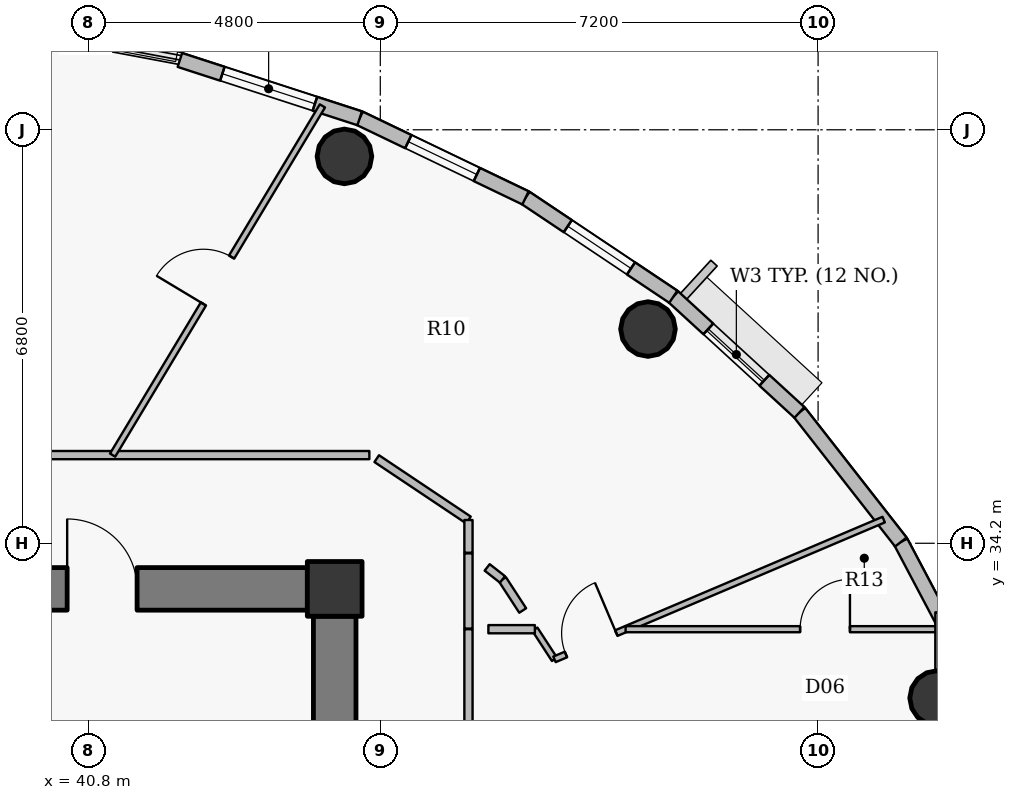
"""IFC4 building model, lengths in metres.
Left out: names, types, materials, properties, quantities, classifications, styles, units other than length and angle.
Written with IfcOpenShell. Run it as: python <this file> out.ifc"""

import sys

from ifc_helpers import new_model, si_unit, direction, frame, frame_2d, origin, origin_2d, place, context, subcontext, project, spatial, rectangle, hollow_circle, extrude, source, transform, mapped, element, fill, save


model = new_model("IFC4")
c1 = context("Model", 3, precision=1e-05, world=origin(), true_north=direction((0.0, 1.0)))
c2 = subcontext(c1, "Body", "Model", "MODEL_VIEW")
j1 = project(units=[si_unit("LENGTHUNIT", "METRE"), si_unit("PLANEANGLEUNIT", "RADIAN")], contexts=[c1])
p1 = place(None, origin())
s1 = spatial("IfcSite", under=j1, at=p1, CompositionType="ELEMENT")
p2 = place(p1, origin())
s2 = spatial("IfcBuilding", under=s1, at=p2, CompositionType="ELEMENT")
p3 = place(p2, frame((0.0, 0.0, 343.0)))
s3 = spatial("IfcBuildingStorey", under=s2, at=p3, CompositionType="ELEMENT", Elevation=343.0)
p4 = place(p3, frame((44.85, 33.45, 0.0), z_axis=(0.0, 0.0, 1.0), x_axis=(1.0, 0.0, 0.0)))
e1 = element("IfcColumn", 1, at=p4, inside=s3, PredefinedType="COLUMN", context=c2, shape_type="SweptSolid", body=[
    extrude(rectangle(XDim=0.9, YDim=0.9, at=origin_2d()), origin(), (0.0, 0.0, 1.0), 3.8),
])
p5 = place(p3, frame((27.6, 33.45, 0.0), z_axis=(0.0, 0.0, 1.0), x_axis=(1.0, 0.0, 0.0)))
e2 = element("IfcWall", 2, at=p5, inside=s3, PredefinedType="SHEAR", context=c2, shape_type="SweptSolid", body=[
    extrude(rectangle(XDim=16.8, YDim=0.7, at=frame_2d((8.4, 0.0))), origin(), (0.0, 0.0, 1.0), 3.05),
])
p6 = place(p5, frame((12.85, 0.0, 0.0)))
e3 = element("IfcOpeningElement", 3, at=p6, cuts=e2, PredefinedType="OPENING", context=c2, shape_type="SweptSolid", body=[
    extrude(rectangle(XDim=1.15, YDim=2.15, at=origin_2d()), frame((0.575, 0.36, 1.075), z_axis=(0.0, -1.0, 0.0), x_axis=(1.0, 0.0, 0.0)), (0.0, 0.0, 1.0), 0.72),
])
p7 = place(p3, frame((44.85, 33.0, 0.0), z_axis=(0.0, 0.0, 1.0), x_axis=(0.0, -1.0, 0.0)))
e4 = element("IfcWall", 4, at=p7, inside=s3, PredefinedType="SHEAR", context=c2, shape_type="SweptSolid", body=[
    extrude(rectangle(XDim=12.0, YDim=0.7, at=frame_2d((6.0, 0.0))), origin(), (0.0, 0.0, 1.0), 3.05),
])
for number, where, z_axis, x_axis in (
    (5, (54.758, 31.655, 0.0), (0.0, 0.0, 1.0), (1.0, 0.0, 0.0)),
    (6, (50.002, 37.723, 0.0), (0.0, 0.0, 1.0), (1.0, 0.0, 0.0)),
    (7, (45.01, 40.562, 0.0), (0.0, 0.0, 1.0), (1.0, 0.0, 0.0)),
):
    element("IfcColumn", number, at=place(p3, frame(where, z_axis=z_axis, x_axis=x_axis)), inside=s3, PredefinedType="COLUMN", context=c2, shape_type="SweptSolid", body=[
        extrude(hollow_circle(Radius=0.45, WallThickness=0.028, at=origin_2d()), origin(), (0.0, 0.0, 1.0), 3.8),
    ])
p8 = place(p3, frame((54.161, 34.221, 0.0), z_axis=(0.0, 0.0, 1.0), x_axis=(0.467487999989, -0.883999417345, 0.0)))
e8 = element("IfcWall", 8, at=p8, inside=s3, PredefinedType="SOLIDWALL", context=c2, shape_type="SweptSolid", body=[
    extrude(rectangle(XDim=2.61, YDim=0.24, at=frame_2d((1.305, 0.0))), origin(), (0.0, 0.0, 1.0), 1.685),
])
p9 = place(p3, frame((52.493, 36.352, 0.0), z_axis=(0.0, 0.0, 1.0), x_axis=(0.616286367698, -0.78752213492, 0.0)))
e9 = element("IfcWall", 9, at=p9, inside=s3, PredefinedType="SOLIDWALL", context=c2, shape_type="SweptSolid", body=[
    extrude(rectangle(XDim=2.706, YDim=0.24, at=frame_2d((1.353, 0.0))), origin(), (0.0, 0.0, 1.0), 3.5),
])
p10 = place(p3, frame((50.419, 38.254, 0.0), z_axis=(0.0, 0.0, 1.0), x_axis=(0.737020907932, -0.675869944051, 0.0)))
e10 = element("IfcWall", 10, at=p10, inside=s3, PredefinedType="SOLIDWALL", context=c2, shape_type="SweptSolid", body=[
    extrude(rectangle(XDim=2.815, YDim=0.24, at=frame_2d((1.407, 0.0))), origin(), (0.0, 0.0, 1.0), 3.5),
])
p11 = place(p10, frame((0.782, 0.0, 0.9)))
e11 = element("IfcOpeningElement", 11, at=p11, cuts=e10, PredefinedType="OPENING", context=c2, shape_type="SweptSolid", body=[
    extrude(rectangle(XDim=1.25, YDim=1.65, at=origin_2d()), frame((0.625, 0.13, 0.825), z_axis=(0.0, -1.0, 0.0), x_axis=(1.0, 0.0, 0.0)), (0.0, 0.0, 1.0), 0.26),
])
p12 = place(p3, frame((47.988, 39.88, 0.0), z_axis=(0.0, 0.0, 1.0), x_axis=(0.831201688654, -0.555970999944, 0.0)))
e12 = element("IfcWall", 12, at=p12, inside=s3, PredefinedType="SOLIDWALL", context=c2, shape_type="SweptSolid", body=[
    extrude(rectangle(XDim=2.925, YDim=0.24, at=frame_2d((1.462, 0.0))), origin(), (0.0, 0.0, 1.0), 3.5),
])
p13 = place(p12, frame((0.837, 0.0, 0.9)))
e13 = element("IfcOpeningElement", 13, at=p13, cuts=e12, PredefinedType="OPENING", context=c2, shape_type="SweptSolid", body=[
    extrude(rectangle(XDim=1.25, YDim=1.65, at=origin_2d()), frame((0.625, 0.13, 0.825), z_axis=(0.0, -1.0, 0.0), x_axis=(1.0, 0.0, 0.0)), (0.0, 0.0, 1.0), 0.26),
])
p14 = place(p3, frame((45.26, 41.189, 0.0), z_axis=(0.0, 0.0, 1.0), x_axis=(0.901557057889, -0.432660226241, 0.0)))
e14 = element("IfcWall", 14, at=p14, inside=s3, PredefinedType="SOLIDWALL", context=c2, shape_type="SweptSolid", body=[
    extrude(rectangle(XDim=3.025, YDim=0.24, at=frame_2d((1.513, 0.0))), origin(), (0.0, 0.0, 1.0), 3.5),
])
p15 = place(p14, frame((0.887, 0.0, 0.9)))
e15 = element("IfcOpeningElement", 15, at=p15, cuts=e14, PredefinedType="OPENING", context=c2, shape_type="SweptSolid", body=[
    extrude(rectangle(XDim=1.25, YDim=1.65, at=origin_2d()), frame((0.625, 0.13, 0.825), z_axis=(0.0, -1.0, 0.0), x_axis=(1.0, 0.0, 0.0)), (0.0, 0.0, 1.0), 0.26),
])
p16 = place(p3, frame((42.304, 42.148, 0.0), z_axis=(0.0, 0.0, 1.0), x_axis=(0.951212850731, -0.308535431682, 0.0)))
e16 = element("IfcWall", 16, at=p16, inside=s3, PredefinedType="SOLIDWALL", context=c2, shape_type="SweptSolid", body=[
    extrude(rectangle(XDim=3.108, YDim=0.24, at=frame_2d((1.554, 0.0))), origin(), (0.0, 0.0, 1.0), 3.5),
])
p17 = place(p16, frame((0.734, 0.0, 0.9)))
e17 = element("IfcOpeningElement", 17, at=p17, cuts=e16, PredefinedType="OPENING", context=c2, shape_type="SweptSolid", body=[
    extrude(rectangle(XDim=1.6, YDim=1.75, at=origin_2d()), frame((0.8, 0.13, 0.875), z_axis=(0.0, -1.0, 0.0), x_axis=(1.0, 0.0, 0.0)), (0.0, 0.0, 1.0), 0.26),
])
p18 = place(p3, frame((36.95, 35.65, 0.0), z_axis=(0.0, 0.0, 1.0), x_axis=(1.0, 0.0, 0.0)))
e18 = element("IfcWall", 18, at=p18, inside=s3, PredefinedType="PARTITIONING", context=c2, shape_type="SweptSolid", body=[
    extrude(rectangle(XDim=8.47, YDim=0.135, at=frame_2d((4.235, 0.0))), origin(), (0.0, 0.0, 1.0), 2.285),
])
p19 = place(p3, frame((41.198, 35.65, 0.0), z_axis=(0.0, 0.0, 1.0), x_axis=(0.515036887737, 0.857168014026, 0.0)))
e19 = element("IfcWall", 19, at=p19, inside=s3, PredefinedType="PARTITIONING", context=c2, shape_type="SweptSolid", body=[
    extrude(rectangle(XDim=6.7, YDim=0.1, at=frame_2d((3.35, 0.0))), origin(), (0.0, 0.0, 1.0), 2.985),
])
p20 = place(p19, frame((2.9, 0.0, 0.0)))
e20 = element("IfcOpeningElement", 20, at=p20, cuts=e19, PredefinedType="OPENING", context=c2, shape_type="SweptSolid", body=[
    extrude(rectangle(XDim=0.9, YDim=2.1, at=origin_2d()), frame((0.45, 0.06, 1.05), z_axis=(0.0, -1.0, 0.0), x_axis=(1.0, 0.0, 0.0)), (0.0, 0.0, 1.0), 0.12),
])
p21 = place(p3, frame((45.541, 35.592, 0.0), z_axis=(0.0, 0.0, 1.0), x_axis=(0.831180227396, -0.556003084151, 0.0)))
e21 = element("IfcWall", 21, at=p21, inside=s3, PredefinedType="PARTITIONING", context=c2, shape_type="SweptSolid", body=[
    extrude(rectangle(XDim=1.815, YDim=0.135, at=frame_2d((0.908, 0.0))), origin(), (0.0, 0.0, 1.0), 2.285),
])
p22 = place(p3, frame((47.05, 19.417, 0.0), z_axis=(0.0, 0.0, 1.0), x_axis=(0.0, 1.0, 0.0)))
e22 = element("IfcWall", 22, at=p22, inside=s3, PredefinedType="PARTITIONING", context=c2, shape_type="SweptSolid", body=[
    extrude(rectangle(XDim=13.37, YDim=0.135, at=frame_2d((6.685, 0.0))), origin(), (0.0, 0.0, 1.0), 2.25),
])
p23 = place(p22, frame((6.434, 0.0, 0.0)))
e23 = element("IfcOpeningElement", 23, at=p23, cuts=e22, PredefinedType="OPENING", context=c2, shape_type="SweptSolid", body=[
    extrude(rectangle(XDim=1.0, YDim=2.15, at=origin_2d()), frame((0.5, 0.078, 1.075), z_axis=(0.0, -1.0, 0.0), x_axis=(1.0, 0.0, 0.0)), (0.0, 0.0, 1.0), 0.155),
])
p24 = place(p3, frame((47.05, 34.044, 0.0), z_axis=(0.0, 0.0, 1.0), x_axis=(0.0, 1.0, 0.0)))
e24 = element("IfcWall", 24, at=p24, inside=s3, PredefinedType="PARTITIONING", context=c2, shape_type="SweptSolid", body=[
    extrude(rectangle(XDim=0.539, YDim=0.135, at=frame_2d((0.269, 0.0))), origin(), (0.0, 0.0, 1.0), 3.5),
])
p25 = place(p3, frame((48.142, 32.787, 0.0), z_axis=(0.0, 0.0, 1.0), x_axis=(0.545336289771, -0.838217353112, 0.0)))
e25 = element("IfcWall", 25, at=p25, inside=s3, PredefinedType="PARTITIONING", context=c2, shape_type="SweptSolid", body=[
    extrude(rectangle(XDim=0.592, YDim=0.1, at=frame_2d((0.296, 0.0))), origin(), (0.0, 0.0, 1.0), 3.5),
])
p26 = place(p3, frame((48.465, 32.291, 0.0), z_axis=(0.0, 0.0, 1.0), x_axis=(0.920507145492, 0.390725728739, 0.0)))
e26 = element("IfcWall", 26, at=p26, inside=s3, PredefinedType="PARTITIONING", context=c2, shape_type="SweptSolid", body=[
    extrude(rectangle(XDim=5.882, YDim=0.1, at=frame_2d((2.941, 0.0))), origin(), (0.0, 0.0, 1.0), 2.985),
])
p27 = place(p26, frame((0.205, 0.0, 0.0)))
e27 = element("IfcOpeningElement", 27, at=p27, cuts=e26, PredefinedType="OPENING", context=c2, shape_type="SweptSolid", body=[
    extrude(rectangle(XDim=0.9, YDim=2.1, at=origin_2d()), frame((0.45, 0.06, 1.05), z_axis=(0.0, -1.0, 0.0), x_axis=(1.0, 0.0, 0.0)), (0.0, 0.0, 1.0), 0.12),
])
p28 = place(p3, frame((49.634, 32.787, 0.0), z_axis=(0.0, 0.0, 1.0), x_axis=(1.0, 0.0, 0.0)))
e28 = element("IfcWall", 28, at=p28, inside=s3, PredefinedType="PARTITIONING", context=c2, shape_type="SweptSolid", body=[
    extrude(rectangle(XDim=5.291, YDim=0.1, at=frame_2d((2.645, 0.0))), origin(), (0.0, 0.0, 1.0), 2.985),
])
p29 = place(p28, frame((2.87, 0.0, 0.0)))
e29 = element("IfcOpeningElement", 29, at=p29, cuts=e28, PredefinedType="OPENING", context=c2, shape_type="SweptSolid", body=[
    extrude(rectangle(XDim=0.82, YDim=2.1, at=origin_2d()), frame((0.41, 0.06, 1.05), z_axis=(0.0, -1.0, 0.0), x_axis=(1.0, 0.0, 0.0)), (0.0, 0.0, 1.0), 0.12),
])
p30 = place(p3, frame((54.778, 22.665, 0.0), z_axis=(0.0, 0.0, 1.0), x_axis=(0.0, 1.0, 0.0)))
e30 = element("IfcWall", 30, at=p30, inside=s3, PredefinedType="PARTITIONING", context=c2, shape_type="SweptSolid", body=[
    extrude(rectangle(XDim=10.4, YDim=0.1, at=frame_2d((5.2, 0.0))), origin(), (0.0, 0.0, 1.0), 2.25),
])
p31 = place(p30, frame((6.139, 0.0, 0.0)))
e31 = element("IfcOpeningElement", 31, at=p31, cuts=e30, PredefinedType="OPENING", context=c2, shape_type="SweptSolid", body=[
    extrude(rectangle(XDim=0.9, YDim=2.1, at=origin_2d()), frame((0.45, 0.06, 1.05), z_axis=(0.0, -1.0, 0.0), x_axis=(1.0, 0.0, 0.0)), (0.0, 0.0, 1.0), 0.12),
])
p32 = place(p3, frame((47.05, 34.034, 0.0), z_axis=(0.0, 0.0, 1.0), x_axis=(0.0, -1.0, 0.0)))
e32 = element("IfcWall", 32, at=p32, inside=s3, PredefinedType="PARTITIONING", context=c2, shape_type="SweptSolid", body=[
    extrude(rectangle(XDim=1.237, YDim=0.135, at=frame_2d((0.618, 0.0))), origin(), (0.0, 0.0, 1.0), 3.5),
])
p33 = place(p3, frame((45.2, 33.8, 0.0), z_axis=(0.0, 0.0, 1.0), x_axis=(-1.0, 0.0, 0.0)))
e33 = element("IfcWall", 33, at=p33, inside=s3, PredefinedType="PARTITIONING", context=c2, shape_type="SweptSolid", body=[
    extrude(rectangle(XDim=0.79, YDim=0.135, at=frame_2d((0.395, 0.0))), origin(), (0.0, 0.0, 1.0), 2.285),
])
p34 = place(p3, frame((45.2, 33.01, 0.0), z_axis=(0.0, 0.0, 1.0), x_axis=(0.0, 1.0, 0.0)))
e34 = element("IfcWall", 34, at=p34, inside=s3, PredefinedType="PARTITIONING", context=c2, shape_type="SweptSolid", body=[
    extrude(rectangle(XDim=0.482, YDim=0.135, at=frame_2d((0.241, 0.0))), origin(), (0.0, 0.0, 1.0), 3.5),
])
p35 = place(p3, frame((47.377, 32.787, 0.0), z_axis=(0.0, 0.0, 1.0), x_axis=(1.0, 0.0, 0.0)))
e35 = element("IfcWall", 35, at=p35, inside=s3, PredefinedType="PARTITIONING", context=c2, shape_type="SweptSolid", body=[
    extrude(rectangle(XDim=0.765, YDim=0.135, at=frame_2d((0.382, 0.0))), origin(), (0.0, 0.0, 1.0), 3.5),
])
p36 = place(p3, frame((47.942, 33.094, 0.0), z_axis=(0.0, 0.0, 1.0), x_axis=(-0.545522826825, 0.838095964322, 0.0)))
e36 = element("IfcWall", 36, at=p36, inside=s3, PredefinedType="PARTITIONING", context=c2, shape_type="SweptSolid", body=[
    extrude(rectangle(XDim=0.61, YDim=0.135, at=frame_2d((0.305, 0.0))), origin(), (0.0, 0.0, 1.0), 3.5),
])
p37 = place(p3, frame((47.609, 33.606, 0.0), z_axis=(0.0, 0.0, 1.0), x_axis=(-0.787376183758, 0.616472826043, 0.0)))
e37 = element("IfcWall", 37, at=p37, inside=s3, PredefinedType="PARTITIONING", context=c2, shape_type="SweptSolid", body=[
    extrude(rectangle(XDim=0.32, YDim=0.135, at=frame_2d((0.16, 0.0))), origin(), (0.0, 0.0, 1.0), 3.5),
])
m1 = source(origin(), c2, "Body", "SweptSolid", [
    extrude(rectangle(XDim=1.25, YDim=1.65, at=origin_2d()), frame((0.625, 0.03, 0.825), z_axis=(0.0, -1.0, 0.0), x_axis=(1.0, 0.0, 0.0)), (0.0, 0.0, 1.0), 0.06),
])
p38 = place(p11, origin())
e38 = element("IfcWindow", 38, at=p38, inside=s3, PartitioningType="SINGLE_PANEL", PredefinedType="WINDOW", context=c2, shape_type="MappedRepresentation", body=[
    mapped(m1, transform((0.0, 0.0, 0.0), x_axis=(1.0, 0.0, 0.0), y_axis=(0.0, 1.0, 0.0), z_axis=(0.0, 0.0, 1.0), scale=1.0)),
])
fill(e11, e38)
p39 = place(p13, origin())
e39 = element("IfcWindow", 39, at=p39, inside=s3, PartitioningType="SINGLE_PANEL", PredefinedType="WINDOW", context=c2, shape_type="MappedRepresentation", body=[
    mapped(m1, transform((0.0, 0.0, 0.0), x_axis=(1.0, 0.0, 0.0), y_axis=(0.0, 1.0, 0.0), z_axis=(0.0, 0.0, 1.0), scale=1.0)),
])
fill(e13, e39)
p40 = place(p15, origin())
e40 = element("IfcWindow", 40, at=p40, inside=s3, PartitioningType="SINGLE_PANEL", PredefinedType="WINDOW", context=c2, shape_type="MappedRepresentation", body=[
    mapped(m1, transform((0.0, 0.0, 0.0), x_axis=(1.0, 0.0, 0.0), y_axis=(0.0, 1.0, 0.0), z_axis=(0.0, 0.0, 1.0), scale=1.0)),
])
fill(e15, e40)
m2 = source(origin(), c2, "Body", "SweptSolid", [
    extrude(rectangle(XDim=1.6, YDim=1.75, at=origin_2d()), frame((0.8, 0.03, 0.875), z_axis=(0.0, -1.0, 0.0), x_axis=(1.0, 0.0, 0.0)), (0.0, 0.0, 1.0), 0.06),
])
p41 = place(p17, origin())
e41 = element("IfcWindow", 41, at=p41, inside=s3, PartitioningType="DOUBLE_PANEL_VERTICAL", PredefinedType="WINDOW", context=c2, shape_type="MappedRepresentation", body=[
    mapped(m2, transform((0.0, 0.0, 0.0), x_axis=(1.0, 0.0, 0.0), y_axis=(0.0, 1.0, 0.0), z_axis=(0.0, 0.0, 1.0), scale=1.0)),
])
fill(e17, e41)
m3 = source(origin(), c2, "Body", "SweptSolid", [
    extrude(rectangle(XDim=1.15, YDim=2.15, at=origin_2d()), frame((0.575, 0.025, 1.075), z_axis=(0.0, -1.0, 0.0), x_axis=(1.0, 0.0, 0.0)), (0.0, 0.0, 1.0), 0.05),
])
p42 = place(p6, origin())
e42 = element("IfcDoor", 42, at=p42, inside=s3, OperationType="SINGLE_SWING_LEFT", PredefinedType="DOOR", context=c2, shape_type="MappedRepresentation", body=[
    mapped(m3, transform((0.0, 0.0, 0.0), x_axis=(1.0, 0.0, 0.0), y_axis=(0.0, 1.0, 0.0), z_axis=(0.0, 0.0, 1.0), scale=1.0)),
])
fill(e3, e42)
m4 = source(origin(), c2, "Body", "SweptSolid", [
    extrude(rectangle(XDim=0.9, YDim=2.1, at=origin_2d()), frame((0.45, 0.025, 1.05), z_axis=(0.0, -1.0, 0.0), x_axis=(1.0, 0.0, 0.0)), (0.0, 0.0, 1.0), 0.05),
])
p43 = place(p27, origin())
e43 = element("IfcDoor", 43, at=p43, inside=s3, OperationType="SINGLE_SWING_RIGHT", PredefinedType="DOOR", context=c2, shape_type="MappedRepresentation", body=[
    mapped(m4, transform((0.0, 0.0, 0.0), x_axis=(1.0, 0.0, 0.0), y_axis=(0.0, 1.0, 0.0), z_axis=(0.0, 0.0, 1.0), scale=1.0)),
])
fill(e27, e43)
p44 = place(p20, origin())
e44 = element("IfcDoor", 44, at=p44, inside=s3, OperationType="SINGLE_SWING_LEFT", PredefinedType="DOOR", context=c2, shape_type="MappedRepresentation", body=[
    mapped(m4, transform((0.0, 0.0, 0.0), x_axis=(1.0, 0.0, 0.0), y_axis=(0.0, 1.0, 0.0), z_axis=(0.0, 0.0, 1.0), scale=1.0)),
])
fill(e20, e44)
m5 = source(origin(), c2, "Body", "SweptSolid", [
    extrude(rectangle(XDim=0.82, YDim=2.1, at=origin_2d()), frame((0.41, 0.025, 1.05), z_axis=(0.0, -1.0, 0.0), x_axis=(1.0, 0.0, 0.0)), (0.0, 0.0, 1.0), 0.05),
])
p45 = place(p29, origin())
e45 = element("IfcDoor", 45, at=p45, inside=s3, OperationType="SINGLE_SWING_RIGHT", PredefinedType="DOOR", context=c2, shape_type="MappedRepresentation", body=[
    mapped(m5, transform((0.0, 0.0, 0.0), x_axis=(1.0, 0.0, 0.0), y_axis=(0.0, 1.0, 0.0), z_axis=(0.0, 0.0, 1.0), scale=1.0)),
])
fill(e29, e45)
save(model, sys.argv[1])
